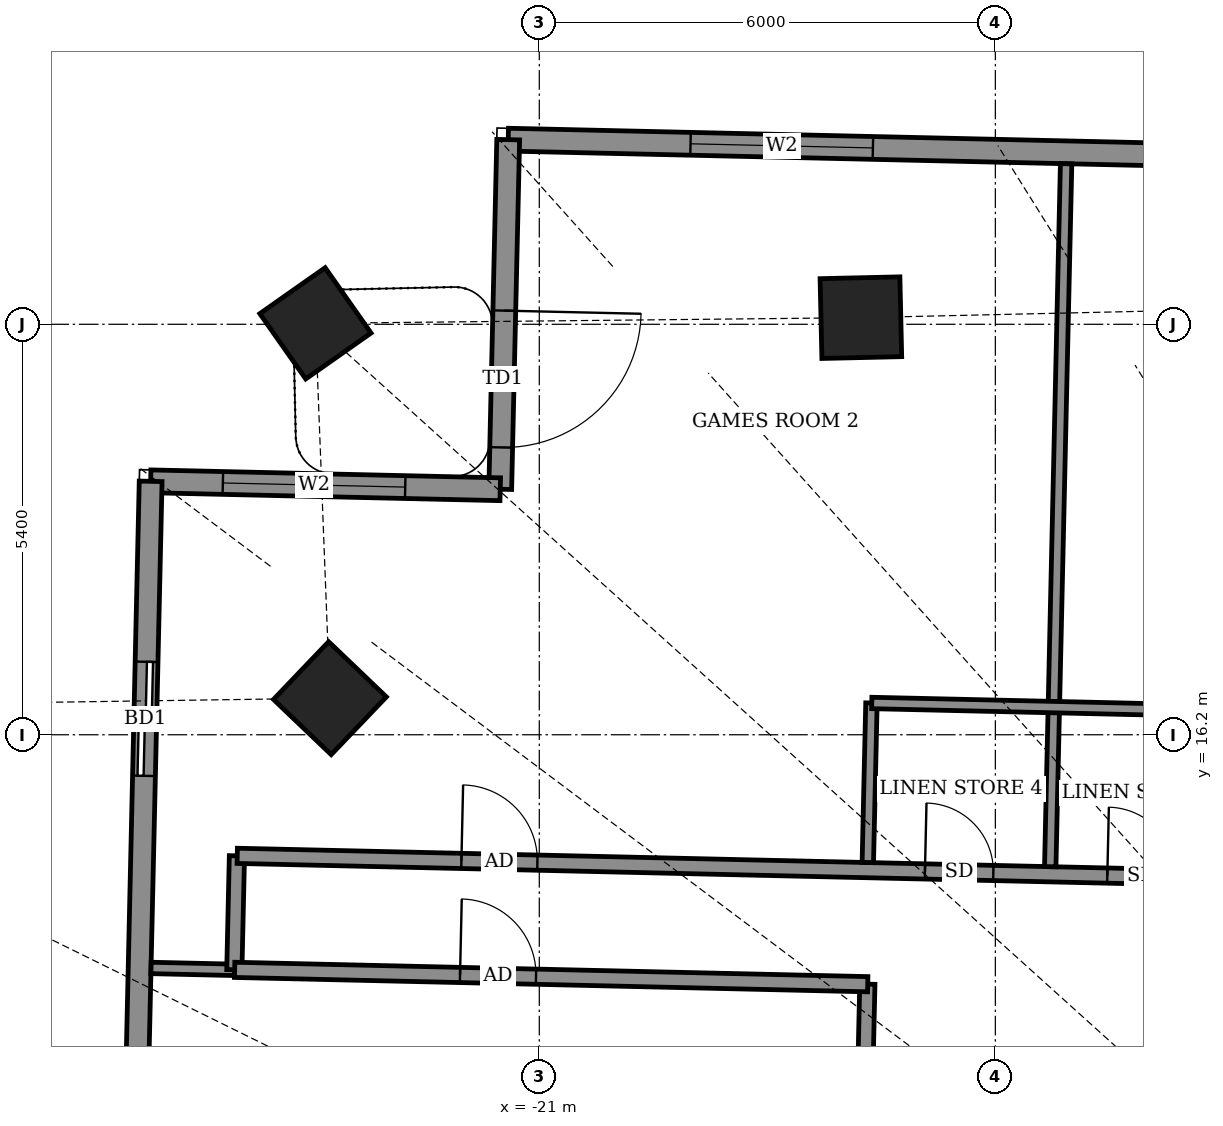
"""IFC4 building model, lengths in metres.
Left out: names, types, materials, properties, quantities, classifications, styles, units other than length and angle.
Written with IfcOpenShell. Run it as: python <this file> out.ifc"""

import sys

from ifc_helpers import new_model, si_unit, direction, frame, frame_2d, origin, origin_2d, place, context, subcontext, project, spatial, rectangle, extrude, element, fill, save


model = new_model("IFC4")
c1 = context("Model", 3, precision=1e-05, world=origin(), true_north=direction((0.0, 1.0)))
c2 = subcontext(c1, "Body", "Model", "MODEL_VIEW")
j1 = project(units=[si_unit("LENGTHUNIT", "METRE"), si_unit("PLANEANGLEUNIT", "RADIAN")], contexts=[c1])
p1 = place(None, origin())
s1 = spatial("IfcSite", under=j1, at=p1, CompositionType="ELEMENT")
p2 = place(p1, origin())
s2 = spatial("IfcBuilding", under=s1, at=p2, CompositionType="ELEMENT")
p3 = place(p2, frame((0.0, 0.0, 252.7)))
s3 = spatial("IfcBuildingStorey", under=s2, at=p3, CompositionType="ELEMENT", Elevation=252.7)
for number, where, z_axis, x_axis in (
    (1, (-16.769, 21.687, -0.55), (0.0, 0.0, 1.0), (-1.0, -0.023, 0.0)),
    (2, (-23.945, 21.613, -0.55), (0.0, 0.0, 1.0), (-0.818, -0.575, 0.0)),
    (3, (-23.754, 16.681, -0.55), (0.0, 0.0, 1.0), (-0.691, -0.723, 0.0)),
):
    element("IfcColumn", number, at=place(p3, frame(where, z_axis=z_axis, x_axis=x_axis)), inside=s3, PredefinedType="COLUMN", context=c2, shape_type="SweptSolid", body=[
        extrude(rectangle(XDim=1.05, YDim=1.05, at=origin_2d()), origin(), (0.0, 0.0, 1.0), 4.6),
    ])
p4 = place(p3, frame((26.35, 22.945, 0.0), z_axis=(0.0, 0.0, 1.0), x_axis=(-0.999742523712, 0.022691105788, 0.0)))
e4 = element("IfcWall", 4, at=p4, inside=s3, PredefinedType="SOLIDWALL", context=c2, shape_type="SweptSolid", body=[
    extrude(rectangle(XDim=47.771, YDim=0.3, at=frame_2d((23.886, 0.0))), origin(), (0.0, 0.0, 1.0), 2.45),
])
p5 = place(p4, frame((1.969, 0.0, 0.0)))
e5 = element("IfcOpeningElement", 5, at=p5, cuts=e4, PredefinedType="OPENING", context=c2, shape_type="SweptSolid", body=[
    extrude(rectangle(XDim=1.5, YDim=2.4, at=frame_2d((0.75, 1.2))), frame((0.0, 0.16, 0.0), z_axis=(0.0, -1.0, 0.0), x_axis=(1.0, 0.0, 0.0)), (0.0, 0.0, 1.0), 0.32),
])
p6 = place(p4, frame((9.356, 0.0, 0.9)))
e6 = element("IfcOpeningElement", 6, at=p6, cuts=e4, PredefinedType="OPENING", context=c2, shape_type="SweptSolid", body=[
    extrude(rectangle(XDim=2.4, YDim=1.5, at=frame_2d((1.2, 0.75))), frame((0.0, 0.16, 0.0), z_axis=(0.0, -1.0, 0.0), x_axis=(1.0, 0.0, 0.0)), (0.0, 0.0, 1.0), 0.32),
])
p7 = place(p4, frame((21.81, 0.0, 0.9)))
e7 = element("IfcOpeningElement", 7, at=p7, cuts=e4, PredefinedType="OPENING", context=c2, shape_type="SweptSolid", body=[
    extrude(rectangle(XDim=2.4, YDim=1.5, at=frame_2d((1.2, 0.75))), frame((0.0, 0.16, 0.0), z_axis=(0.0, -1.0, 0.0), x_axis=(1.0, 0.0, 0.0)), (0.0, 0.0, 1.0), 0.32),
])
p8 = place(p4, frame((25.667, 0.0, 0.0)))
e8 = element("IfcOpeningElement", 8, at=p8, cuts=e4, PredefinedType="OPENING", context=c2, shape_type="SweptSolid", body=[
    extrude(rectangle(XDim=1.5, YDim=2.4, at=frame_2d((0.75, 1.2))), frame((0.0, 0.16, 0.0), z_axis=(0.0, -1.0, 0.0), x_axis=(1.0, 0.0, 0.0)), (0.0, 0.0, 1.0), 0.32),
])
p9 = place(p4, frame((30.997, 0.0, 0.9)))
e9 = element("IfcOpeningElement", 9, at=p9, cuts=e4, PredefinedType="OPENING", context=c2, shape_type="SweptSolid", body=[
    extrude(rectangle(XDim=2.4, YDim=1.5, at=frame_2d((1.2, 0.75))), frame((0.0, 0.16, 0.0), z_axis=(0.0, -1.0, 0.0), x_axis=(1.0, 0.0, 0.0)), (0.0, 0.0, 1.0), 0.32),
])
p10 = place(p4, frame((36.222, 0.0, 0.9)))
e10 = element("IfcOpeningElement", 10, at=p10, cuts=e4, PredefinedType="OPENING", context=c2, shape_type="SweptSolid", body=[
    extrude(rectangle(XDim=2.4, YDim=1.5, at=frame_2d((1.2, 0.75))), frame((0.0, 0.16, 0.0), z_axis=(0.0, -1.0, 0.0), x_axis=(1.0, 0.0, 0.0)), (0.0, 0.0, 1.0), 0.32),
])
p11 = place(p4, frame((42.972, 0.0, 0.9)))
e11 = element("IfcOpeningElement", 11, at=p11, cuts=e4, PredefinedType="OPENING", context=c2, shape_type="SweptSolid", body=[
    extrude(rectangle(XDim=2.4, YDim=1.5, at=frame_2d((1.2, 0.75))), frame((0.0, 0.16, 0.0), z_axis=(0.0, -1.0, 0.0), x_axis=(1.0, 0.0, 0.0)), (0.0, 0.0, 1.0), 0.32),
])
p12 = place(p3, frame((-21.409, 24.029, 0.0), z_axis=(0.0, 0.0, 1.0), x_axis=(-0.022820258049, -0.999739584003, 0.0)))
e12 = element("IfcWall", 12, at=p12, inside=s3, PredefinedType="SOLIDWALL", context=c2, shape_type="SweptSolid", body=[
    extrude(rectangle(XDim=4.6, YDim=0.3, at=frame_2d((2.3, 0.0))), origin(), (0.0, 0.0, 1.0), 2.45),
])
p13 = place(p12, frame((2.25, 0.0, 0.0)))
e13 = element("IfcOpeningElement", 13, at=p13, cuts=e12, PredefinedType="OPENING", context=c2, shape_type="SweptSolid", body=[
    extrude(rectangle(XDim=1.8, YDim=2.4, at=frame_2d((0.9, 1.2))), frame((0.0, 0.16, 0.0), z_axis=(0.0, -1.0, 0.0), x_axis=(1.0, 0.0, 0.0)), (0.0, 0.0, 1.0), 0.32),
])
p14 = place(p3, frame((-21.514, 19.43, 0.0), z_axis=(0.0, 0.0, 1.0), x_axis=(-0.999744404568, 0.02260808559, 0.0)))
e14 = element("IfcWall", 14, at=p14, inside=s3, PredefinedType="SOLIDWALL", context=c2, shape_type="SweptSolid", body=[
    extrude(rectangle(XDim=4.6, YDim=0.3, at=frame_2d((2.3, 0.0))), origin(), (0.0, 0.0, 1.0), 2.45),
])
p15 = place(p14, frame((1.25, 0.0, 0.9)))
e15 = element("IfcOpeningElement", 15, at=p15, cuts=e14, PredefinedType="OPENING", context=c2, shape_type="SweptSolid", body=[
    extrude(rectangle(XDim=2.4, YDim=1.5, at=frame_2d((1.2, 0.75))), frame((0.0, 0.16, 0.0), z_axis=(0.0, -1.0, 0.0), x_axis=(1.0, 0.0, 0.0)), (0.0, 0.0, 1.0), 0.32),
])
p16 = place(p3, frame((-26.113, 19.534, 0.0), z_axis=(0.0, 0.0, 1.0), x_axis=(-0.022654755793, -0.999743348085, 0.0)))
e16 = element("IfcWall", 16, at=p16, inside=s3, PredefinedType="SOLIDWALL", context=c2, shape_type="SweptSolid", body=[
    extrude(rectangle(XDim=13.729, YDim=0.3, at=frame_2d((6.865, 0.0))), origin(), (0.0, 0.0, 1.0), 2.45),
])
p17 = place(p16, frame((2.375, 0.0, 0.0)))
e17 = element("IfcOpeningElement", 17, at=p17, cuts=e16, PredefinedType="OPENING", context=c2, shape_type="SweptSolid", body=[
    extrude(rectangle(XDim=1.5, YDim=2.4, at=frame_2d((0.75, 1.2))), frame((0.0, 0.16, 0.0), z_axis=(0.0, -1.0, 0.0), x_axis=(1.0, 0.0, 0.0)), (0.0, 0.0, 1.0), 0.32),
])
p18 = place(p16, frame((8.837, 0.0, 0.9)))
e18 = element("IfcOpeningElement", 18, at=p18, cuts=e16, PredefinedType="OPENING", context=c2, shape_type="SweptSolid", body=[
    extrude(rectangle(XDim=2.4, YDim=1.5, at=frame_2d((1.2, 0.75))), frame((0.0, 0.16, 0.0), z_axis=(0.0, -1.0, 0.0), x_axis=(1.0, 0.0, 0.0)), (0.0, 0.0, 1.0), 0.32),
])
p19 = place(p3, frame((-17.262, -12.525, 0.0), z_axis=(0.0, 0.0, 1.0), x_axis=(0.022706151961, 0.999742182097, 0.0)))
e19 = element("IfcWall", 19, at=p19, inside=s3, PredefinedType="PARTITIONING", context=c2, shape_type="SweptSolid", body=[
    extrude(rectangle(XDim=25.45, YDim=0.2, at=frame_2d((12.725, 0.0))), origin(), (0.0, 0.0, 1.0), 2.45),
])
p20 = place(p19, frame((15.314, 0.0, 0.0)))
e20 = element("IfcOpeningElement", 20, at=p20, cuts=e19, PredefinedType="OPENING", context=c2, shape_type="SweptSolid", body=[
    extrude(rectangle(XDim=1.0, YDim=2.1, at=frame_2d((0.5, 1.05))), frame((0.0, 0.11, 0.0), z_axis=(0.0, -1.0, 0.0), x_axis=(1.0, 0.0, 0.0)), (0.0, 0.0, 1.0), 0.22),
])
p21 = place(p19, frame((10.143, 0.0, 0.0)))
e21 = element("IfcOpeningElement", 21, at=p21, cuts=e19, PredefinedType="OPENING", context=c2, shape_type="SweptSolid", body=[
    extrude(rectangle(XDim=1.0, YDim=2.1, at=frame_2d((0.5, 1.05))), frame((0.0, 0.11, 0.0), z_axis=(0.0, -1.0, 0.0), x_axis=(1.0, 0.0, 0.0)), (0.0, 0.0, 1.0), 0.22),
])
p22 = place(p19, frame((5.578, 0.0, 0.0)))
e22 = element("IfcOpeningElement", 22, at=p22, cuts=e19, PredefinedType="OPENING", context=c2, shape_type="SweptSolid", body=[
    extrude(rectangle(XDim=1.0, YDim=2.1, at=frame_2d((0.5, 1.05))), frame((0.0, 0.11, 0.0), z_axis=(0.0, -1.0, 0.0), x_axis=(1.0, 0.0, 0.0)), (0.0, 0.0, 1.0), 0.22),
])
p23 = place(p19, frame((0.562, 0.0, 0.0)))
e23 = element("IfcOpeningElement", 23, at=p23, cuts=e19, PredefinedType="OPENING", context=c2, shape_type="SweptSolid", body=[
    extrude(rectangle(XDim=0.9, YDim=2.1, at=frame_2d((0.45, 1.05))), frame((0.0, 0.11, 0.0), z_axis=(0.0, -1.0, 0.0), x_axis=(1.0, 0.0, 0.0)), (0.0, 0.0, 1.0), 0.22),
])
p24 = place(p3, frame((-26.108, 13.132, 0.0), z_axis=(0.0, 0.0, 1.0), x_axis=(0.999740692912, -0.02277162569, 0.0)))
e24 = element("IfcWall", 24, at=p24, inside=s3, PredefinedType="PARTITIONING", context=c2, shape_type="SweptSolid", body=[
    extrude(rectangle(XDim=1.104, YDim=0.15, at=frame_2d((0.552, 0.0))), origin(), (0.0, 0.0, 1.0), 2.55),
])
p25 = place(p3, frame((-25.012, 13.108, 0.0), z_axis=(0.0, 0.0, 1.0), x_axis=(0.022632637625, 0.99974384905, 0.0)))
e25 = element("IfcWall", 25, at=p25, inside=s3, PredefinedType="PARTITIONING", context=c2, shape_type="SweptSolid", body=[
    extrude(rectangle(XDim=1.5, YDim=0.2, at=frame_2d((0.75, 0.0))), origin(), (0.0, 0.0, 1.0), 2.55),
])
p26 = place(p3, frame((-25.008, 13.107, 0.0), z_axis=(0.0, 0.0, 1.0), x_axis=(0.999742742467, -0.022681465666, 0.0)))
e26 = element("IfcWall", 26, at=p26, inside=s3, PredefinedType="PARTITIONING", context=c2, shape_type="SweptSolid", body=[
    extrude(rectangle(XDim=8.331, YDim=0.2, at=frame_2d((4.166, 0.0))), origin(), (0.0, 0.0, 1.0), 2.55),
])
p27 = place(p26, frame((2.966, 0.0, 0.0)))
e27 = element("IfcOpeningElement", 27, at=p27, cuts=e26, PredefinedType="OPENING", context=c2, shape_type="SweptSolid", body=[
    extrude(rectangle(XDim=1.0, YDim=2.1, at=frame_2d((0.5, 1.05))), frame((0.0, 0.11, 0.0), z_axis=(0.0, -1.0, 0.0), x_axis=(1.0, 0.0, 0.0)), (0.0, 0.0, 1.0), 0.22),
])
p28 = place(p3, frame((-24.974, 14.607, 0.0), z_axis=(0.0, 0.0, 1.0), x_axis=(0.999742823946, -0.02267787398, 0.0)))
e28 = element("IfcWall", 28, at=p28, inside=s3, PredefinedType="PARTITIONING", context=c2, shape_type="SweptSolid", body=[
    extrude(rectangle(XDim=48.284, YDim=0.2, at=frame_2d((24.142, 0.0))), origin(), (0.0, 0.0, 1.0), 2.45),
])
p29 = place(p28, frame((46.283, 0.0, 0.0)))
e29 = element("IfcOpeningElement", 29, at=p29, cuts=e28, PredefinedType="OPENING", context=c2, shape_type="SweptSolid", body=[
    extrude(rectangle(XDim=1.0, YDim=2.1, at=frame_2d((0.5, 1.05))), frame((0.0, 0.11, 0.0), z_axis=(0.0, -1.0, 0.0), x_axis=(1.0, 0.0, 0.0)), (0.0, 0.0, 1.0), 0.22),
])
p30 = place(p28, frame((43.75, 0.0, 0.0)))
e30 = element("IfcOpeningElement", 30, at=p30, cuts=e28, PredefinedType="OPENING", context=c2, shape_type="SweptSolid", body=[
    extrude(rectangle(XDim=0.9, YDim=2.1, at=frame_2d((0.45, 1.05))), frame((0.0, 0.11, 0.0), z_axis=(0.0, -1.0, 0.0), x_axis=(1.0, 0.0, 0.0)), (0.0, 0.0, 1.0), 0.22),
])
p31 = place(p28, frame((39.4, 0.0, 0.0)))
e31 = element("IfcOpeningElement", 31, at=p31, cuts=e28, PredefinedType="OPENING", context=c2, shape_type="SweptSolid", body=[
    extrude(rectangle(XDim=1.0, YDim=2.1, at=frame_2d((0.5, 1.05))), frame((0.0, 0.11, 0.0), z_axis=(0.0, -1.0, 0.0), x_axis=(1.0, 0.0, 0.0)), (0.0, 0.0, 1.0), 0.22),
])
p32 = place(p28, frame((35.25, 0.0, 0.0)))
e32 = element("IfcOpeningElement", 32, at=p32, cuts=e28, PredefinedType="OPENING", context=c2, shape_type="SweptSolid", body=[
    extrude(rectangle(XDim=0.9, YDim=2.1, at=frame_2d((0.45, 1.05))), frame((0.0, 0.11, 0.0), z_axis=(0.0, -1.0, 0.0), x_axis=(1.0, 0.0, 0.0)), (0.0, 0.0, 1.0), 0.22),
])
p33 = place(p28, frame((28.625, 0.0, 0.0)))
e33 = element("IfcOpeningElement", 33, at=p33, cuts=e28, PredefinedType="OPENING", context=c2, shape_type="SweptSolid", body=[
    extrude(rectangle(XDim=1.0, YDim=2.1, at=frame_2d((0.5, 1.05))), frame((0.0, 0.11, 0.0), z_axis=(0.0, -1.0, 0.0), x_axis=(1.0, 0.0, 0.0)), (0.0, 0.0, 1.0), 0.22),
])
p34 = place(p28, frame((32.85, 0.0, 0.0)))
e34 = element("IfcOpeningElement", 34, at=p34, cuts=e28, PredefinedType="OPENING", context=c2, shape_type="SweptSolid", body=[
    extrude(rectangle(XDim=0.9, YDim=2.1, at=frame_2d((0.45, 1.05))), frame((0.0, 0.11, 0.0), z_axis=(0.0, -1.0, 0.0), x_axis=(1.0, 0.0, 0.0)), (0.0, 0.0, 1.0), 0.22),
])
p35 = place(p28, frame((24.4, 0.0, 0.0)))
e35 = element("IfcOpeningElement", 35, at=p35, cuts=e28, PredefinedType="OPENING", context=c2, shape_type="SweptSolid", body=[
    extrude(rectangle(XDim=0.9, YDim=2.1, at=frame_2d((0.45, 1.05))), frame((0.0, 0.11, 0.0), z_axis=(0.0, -1.0, 0.0), x_axis=(1.0, 0.0, 0.0)), (0.0, 0.0, 1.0), 0.22),
])
p36 = place(p28, frame((17.225, 0.0, 0.0)))
e36 = element("IfcOpeningElement", 36, at=p36, cuts=e28, PredefinedType="OPENING", context=c2, shape_type="SweptSolid", body=[
    extrude(rectangle(XDim=1.0, YDim=2.1, at=frame_2d((0.5, 1.05))), frame((0.0, 0.11, 0.0), z_axis=(0.0, -1.0, 0.0), x_axis=(1.0, 0.0, 0.0)), (0.0, 0.0, 1.0), 0.22),
])
p37 = place(p28, frame((19.5, 0.0, 0.0)))
e37 = element("IfcOpeningElement", 37, at=p37, cuts=e28, PredefinedType="OPENING", context=c2, shape_type="SweptSolid", body=[
    extrude(rectangle(XDim=0.9, YDim=2.1, at=frame_2d((0.45, 1.05))), frame((0.0, 0.11, 0.0), z_axis=(0.0, -1.0, 0.0), x_axis=(1.0, 0.0, 0.0)), (0.0, 0.0, 1.0), 0.22),
])
p38 = place(p28, frame((14.4, 0.0, 0.0)))
e38 = element("IfcOpeningElement", 38, at=p38, cuts=e28, PredefinedType="OPENING", context=c2, shape_type="SweptSolid", body=[
    extrude(rectangle(XDim=1.0, YDim=2.1, at=frame_2d((0.5, 1.05))), frame((0.0, 0.11, 0.0), z_axis=(0.0, -1.0, 0.0), x_axis=(1.0, 0.0, 0.0)), (0.0, 0.0, 1.0), 0.22),
])
p39 = place(p28, frame((11.45, 0.0, 0.0)))
e39 = element("IfcOpeningElement", 39, at=p39, cuts=e28, PredefinedType="OPENING", context=c2, shape_type="SweptSolid", body=[
    extrude(rectangle(XDim=0.9, YDim=2.1, at=frame_2d((0.45, 1.05))), frame((0.0, 0.11, 0.0), z_axis=(0.0, -1.0, 0.0), x_axis=(1.0, 0.0, 0.0)), (0.0, 0.0, 1.0), 0.22),
])
p40 = place(p28, frame((2.95, 0.0, 0.0)))
e40 = element("IfcOpeningElement", 40, at=p40, cuts=e28, PredefinedType="OPENING", context=c2, shape_type="SweptSolid", body=[
    extrude(rectangle(XDim=1.0, YDim=2.1, at=frame_2d((0.5, 1.05))), frame((0.0, 0.11, 0.0), z_axis=(0.0, -1.0, 0.0), x_axis=(1.0, 0.0, 0.0)), (0.0, 0.0, 1.0), 0.22),
])
p41 = place(p28, frame((9.05, 0.0, 0.0)))
e41 = element("IfcOpeningElement", 41, at=p41, cuts=e28, PredefinedType="OPENING", context=c2, shape_type="SweptSolid", body=[
    extrude(rectangle(XDim=0.9, YDim=2.1, at=frame_2d((0.45, 1.05))), frame((0.0, 0.11, 0.0), z_axis=(0.0, -1.0, 0.0), x_axis=(1.0, 0.0, 0.0)), (0.0, 0.0, 1.0), 0.22),
])
p42 = place(p3, frame((-16.678, 14.519, 0.0), z_axis=(0.0, 0.0, 1.0), x_axis=(0.022908956429, 0.999737555419, 0.0)))
e42 = element("IfcWall", 42, at=p42, inside=s3, PredefinedType="PARTITIONING", context=c2, shape_type="SweptSolid", body=[
    extrude(rectangle(XDim=2.099, YDim=0.15, at=frame_2d((1.05, 0.0))), origin(), (0.0, 0.0, 1.0), 2.45),
])
p43 = place(p3, frame((-14.278, 14.464, 0.0), z_axis=(0.0, 0.0, 1.0), x_axis=(0.022592505393, 0.999744756775, 0.0)))
e43 = element("IfcWall", 43, at=p43, inside=s3, PredefinedType="PARTITIONING", context=c2, shape_type="SweptSolid", body=[
    extrude(rectangle(XDim=9.25, YDim=0.15, at=frame_2d((4.625, 0.0))), origin(), (0.0, 0.0, 1.0), 2.45),
])
p44 = place(p3, frame((-16.626, 16.618, 0.0), z_axis=(0.0, 0.0, 1.0), x_axis=(0.999742701292, -0.022683280499, 0.0)))
e44 = element("IfcWall", 44, at=p44, inside=s3, PredefinedType="PARTITIONING", context=c2, shape_type="SweptSolid", body=[
    extrude(rectangle(XDim=4.8, YDim=0.15, at=frame_2d((2.4, 0.0))), origin(), (0.0, 0.0, 1.0), 2.75),
])
p45 = place(p11, origin())
e45 = element("IfcWindow", 45, at=p45, inside=s3, PartitioningType="DOUBLE_PANEL_VERTICAL", PredefinedType="WINDOW", context=c2, shape_type="SweptSolid", body=[
    extrude(rectangle(XDim=2.4, YDim=1.5, at=frame_2d((1.2, 0.75))), frame((0.0, 0.03, 0.0), z_axis=(0.0, -1.0, 0.0), x_axis=(1.0, 0.0, 0.0)), (0.0, 0.0, 1.0), 0.06),
])
fill(e11, e45)
p46 = place(p13, origin())
e46 = element("IfcDoor", 46, at=p46, inside=s3, OperationType="DOUBLE_DOOR_SINGLE_SWING", PredefinedType="DOOR", context=c2, shape_type="SweptSolid", body=[
    extrude(rectangle(XDim=1.8, YDim=2.4, at=frame_2d((0.9, 1.2))), frame((0.0, 0.025, 0.0), z_axis=(0.0, -1.0, 0.0), x_axis=(1.0, 0.0, 0.0)), (0.0, 0.0, 1.0), 0.05),
])
fill(e13, e46)
p47 = place(p15, origin())
e47 = element("IfcWindow", 47, at=p47, inside=s3, PartitioningType="DOUBLE_PANEL_VERTICAL", PredefinedType="WINDOW", context=c2, shape_type="SweptSolid", body=[
    extrude(rectangle(XDim=2.4, YDim=1.5, at=frame_2d((1.2, 0.75))), frame((0.0, 0.03, 0.0), z_axis=(0.0, -1.0, 0.0), x_axis=(1.0, 0.0, 0.0)), (0.0, 0.0, 1.0), 0.06),
])
fill(e15, e47)
p48 = place(p17, origin())
e48 = element("IfcDoor", 48, at=p48, inside=s3, OperationType="SLIDING_TO_LEFT", PredefinedType="DOOR", context=c2, shape_type="SweptSolid", body=[
    extrude(rectangle(XDim=1.5, YDim=2.4, at=frame_2d((0.75, 1.2))), frame((0.0, 0.025, 0.0), z_axis=(0.0, -1.0, 0.0), x_axis=(1.0, 0.0, 0.0)), (0.0, 0.0, 1.0), 0.05),
])
fill(e17, e48)
p49 = place(p39, origin())
e49 = element("IfcDoor", 49, at=p49, inside=s3, OperationType="SINGLE_SWING_LEFT", PredefinedType="DOOR", context=c2, shape_type="SweptSolid", body=[
    extrude(rectangle(XDim=0.9, YDim=2.1, at=frame_2d((0.45, 1.05))), frame((0.0, 0.025, 0.0), z_axis=(0.0, -1.0, 0.0), x_axis=(1.0, 0.0, 0.0)), (0.0, 0.0, 1.0), 0.05),
])
fill(e39, e49)
p50 = place(p40, origin())
e50 = element("IfcDoor", 50, at=p50, inside=s3, OperationType="SINGLE_SWING_RIGHT", PredefinedType="DOOR", context=c2, shape_type="SweptSolid", body=[
    extrude(rectangle(XDim=1.0, YDim=2.1, at=frame_2d((0.5, 1.05))), frame((0.0, 0.025, 0.0), z_axis=(0.0, -1.0, 0.0), x_axis=(1.0, 0.0, 0.0)), (0.0, 0.0, 1.0), 0.05),
])
fill(e40, e50)
p51 = place(p41, origin())
e51 = element("IfcDoor", 51, at=p51, inside=s3, OperationType="SINGLE_SWING_RIGHT", PredefinedType="DOOR", context=c2, shape_type="SweptSolid", body=[
    extrude(rectangle(XDim=0.9, YDim=2.1, at=frame_2d((0.45, 1.05))), frame((0.0, 0.025, 0.0), z_axis=(0.0, -1.0, 0.0), x_axis=(1.0, 0.0, 0.0)), (0.0, 0.0, 1.0), 0.05),
])
fill(e41, e51)
p52 = place(p27, origin())
e52 = element("IfcDoor", 52, at=p52, inside=s3, OperationType="SINGLE_SWING_LEFT", PredefinedType="DOOR", context=c2, shape_type="SweptSolid", body=[
    extrude(rectangle(XDim=1.0, YDim=2.1, at=frame_2d((0.5, 1.05))), frame((0.0, 0.025, 0.0), z_axis=(0.0, -1.0, 0.0), x_axis=(1.0, 0.0, 0.0)), (0.0, 0.0, 1.0), 0.05),
])
fill(e27, e52)
save(model, sys.argv[1])
